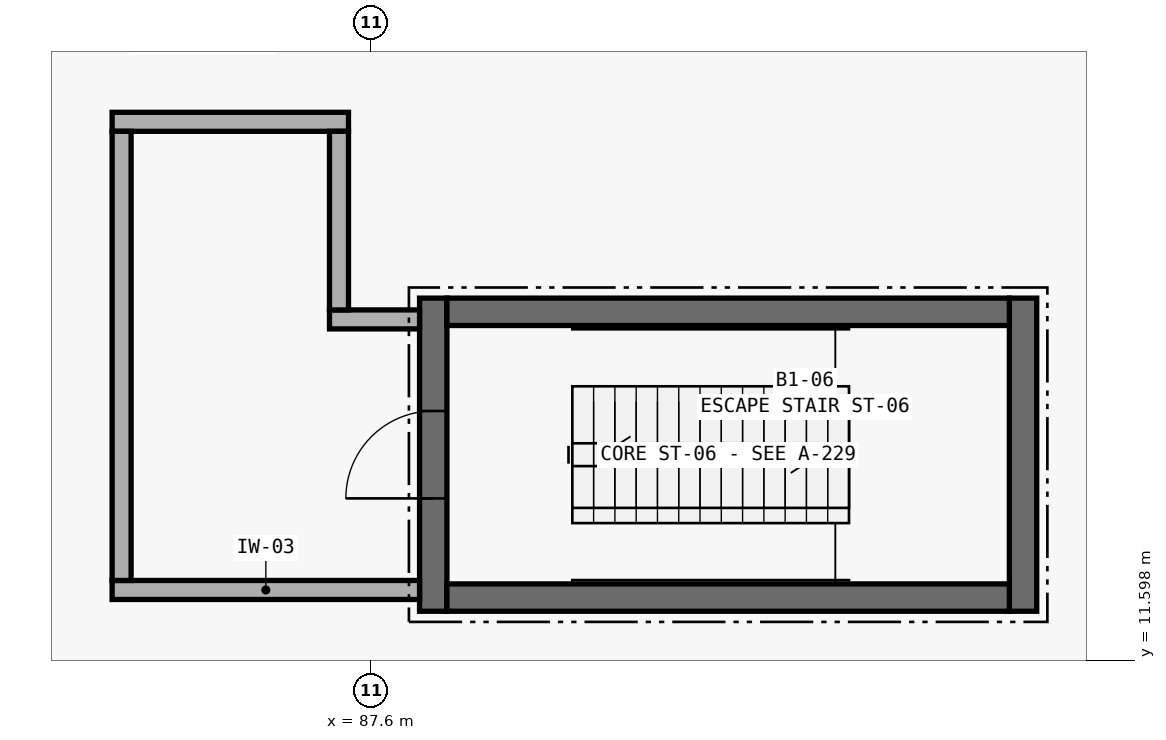
"""IFC4 building model, lengths in metres.
Left out: names, types, materials, properties, quantities, classifications, styles, units other than length and angle.
Written with IfcOpenShell. Run it as: python <this file> out.ifc"""

import sys

from ifc_helpers import new_model, si_unit, direction, frame, frame_2d, origin, place, context, subcontext, project, spatial, rectangle, extrude, element, fill, save


model = new_model("IFC4")
c1 = context("Model", 3, precision=1e-05, world=origin(), true_north=direction((0.0, 1.0)))
c2 = subcontext(c1, "Body", "Model", "MODEL_VIEW")
j1 = project(units=[si_unit("LENGTHUNIT", "METRE"), si_unit("PLANEANGLEUNIT", "RADIAN")], contexts=[c1])
p1 = place(None, origin())
s1 = spatial("IfcSite", under=j1, at=p1, CompositionType="ELEMENT")
p2 = place(p1, origin())
s2 = spatial("IfcBuilding", under=s1, at=p2, CompositionType="ELEMENT")
p3 = place(p2, frame((0.0, 0.0, -4.8)))
s3 = spatial("IfcBuildingStorey", under=s2, at=p3, CompositionType="ELEMENT", Elevation=-4.8)
p4 = place(p3, frame((88.42, 12.24, 0.0), z_axis=(0.0, 0.0, 1.0), x_axis=(0.0, 1.0, 0.0)))
e1 = element("IfcWall", 1, at=p4, inside=s3, PredefinedType="SHEAR", context=c2, shape_type="SweptSolid", body=[
    extrude(rectangle(XDim=4.12, YDim=0.36, at=frame_2d((2.06, 0.0))), origin(), (0.0, 0.0, 1.0), 4.38),
])
p5 = place(p4, frame((1.485, 0.0, 0.0)))
e2 = element("IfcOpeningElement", 2, at=p5, cuts=e1, PredefinedType="OPENING", context=c2, shape_type="SweptSolid", body=[
    extrude(rectangle(XDim=1.15, YDim=2.15, at=frame_2d((0.575, 1.075))), frame((0.0, 0.195, 0.0), z_axis=(0.0, -1.0, 0.0), x_axis=(1.0, 0.0, 0.0)), (0.0, 0.0, 1.0), 0.39),
])
p6 = place(p3, frame((96.18, 12.24, 0.0), z_axis=(0.0, 0.0, 1.0), x_axis=(0.0, 1.0, 0.0)))
e3 = element("IfcWall", 3, at=p6, inside=s3, PredefinedType="SHEAR", context=c2, shape_type="SweptSolid", body=[
    extrude(rectangle(XDim=4.12, YDim=0.36, at=frame_2d((2.06, 0.0))), origin(), (0.0, 0.0, 1.0), 4.38),
])
for number, where, z_axis, x_axis in (
    (4, (88.6, 16.18, 0.0), (0.0, 0.0, 1.0), (1.0, 0.0, 0.0)),
    (5, (88.6, 12.42, 0.0), (0.0, 0.0, 1.0), (1.0, 0.0, 0.0)),
):
    element("IfcWall", number, at=place(p3, frame(where, z_axis=z_axis, x_axis=x_axis)), inside=s3, PredefinedType="SHEAR", context=c2, shape_type="SweptSolid", body=[
        extrude(rectangle(XDim=7.4, YDim=0.36, at=frame_2d((3.7, 0.0))), origin(), (0.0, 0.0, 1.0), 4.38),
    ])
p7 = place(p3, frame((84.195, 12.52, 0.0), z_axis=(0.0, 0.0, 1.0), x_axis=(1.0, 0.0, 0.0)))
e6 = element("IfcWall", 6, at=p7, inside=s3, PredefinedType="PARTITIONING", context=c2, shape_type="SweptSolid", body=[
    extrude(rectangle(XDim=4.045, YDim=0.25, at=frame_2d((2.022, 0.0))), origin(), (0.0, 0.0, 1.0), 3.26),
])
p8 = place(p3, frame((87.055, 16.08, 0.0), z_axis=(0.0, 0.0, 1.0), x_axis=(1.0, 0.0, 0.0)))
e7 = element("IfcWall", 7, at=p8, inside=s3, PredefinedType="PARTITIONING", context=c2, shape_type="SweptSolid", body=[
    extrude(rectangle(XDim=1.185, YDim=0.25, at=frame_2d((0.593, 0.0))), origin(), (0.0, 0.0, 1.0), 3.26),
])
p9 = place(p3, frame((84.195, 18.68, 0.0), z_axis=(0.0, 0.0, 1.0), x_axis=(1.0, 0.0, 0.0)))
e8 = element("IfcWall", 8, at=p9, inside=s3, PredefinedType="PARTITIONING", context=c2, shape_type="SweptSolid", body=[
    extrude(rectangle(XDim=3.11, YDim=0.25, at=frame_2d((1.555, 0.0))), origin(), (0.0, 0.0, 1.0), 3.26),
])
p10 = place(p3, frame((84.32, 12.645, 0.0), z_axis=(0.0, 0.0, 1.0), x_axis=(0.0, 1.0, 0.0)))
e9 = element("IfcWall", 9, at=p10, inside=s3, PredefinedType="PARTITIONING", context=c2, shape_type="SweptSolid", body=[
    extrude(rectangle(XDim=5.91, YDim=0.25, at=frame_2d((2.955, 0.0))), origin(), (0.0, 0.0, 1.0), 3.26),
])
p11 = place(p3, frame((87.18, 16.205, 0.0), z_axis=(0.0, 0.0, 1.0), x_axis=(0.0, 1.0, 0.0)))
e10 = element("IfcWall", 10, at=p11, inside=s3, PredefinedType="PARTITIONING", context=c2, shape_type="SweptSolid", body=[
    extrude(rectangle(XDim=2.35, YDim=0.25, at=frame_2d((1.175, 0.0))), origin(), (0.0, 0.0, 1.0), 3.26),
])
p12 = place(p5, origin())
e11 = element("IfcDoor", 11, at=p12, inside=s3, OperationType="SINGLE_SWING_LEFT", PredefinedType="DOOR", context=c2, shape_type="SweptSolid", body=[
    extrude(rectangle(XDim=1.15, YDim=2.15, at=frame_2d((0.575, 1.075))), frame((0.0, 0.025, 0.0), z_axis=(0.0, -1.0, 0.0), x_axis=(1.0, 0.0, 0.0)), (0.0, 0.0, 1.0), 0.05),
])
fill(e2, e11)
save(model, sys.argv[1])
